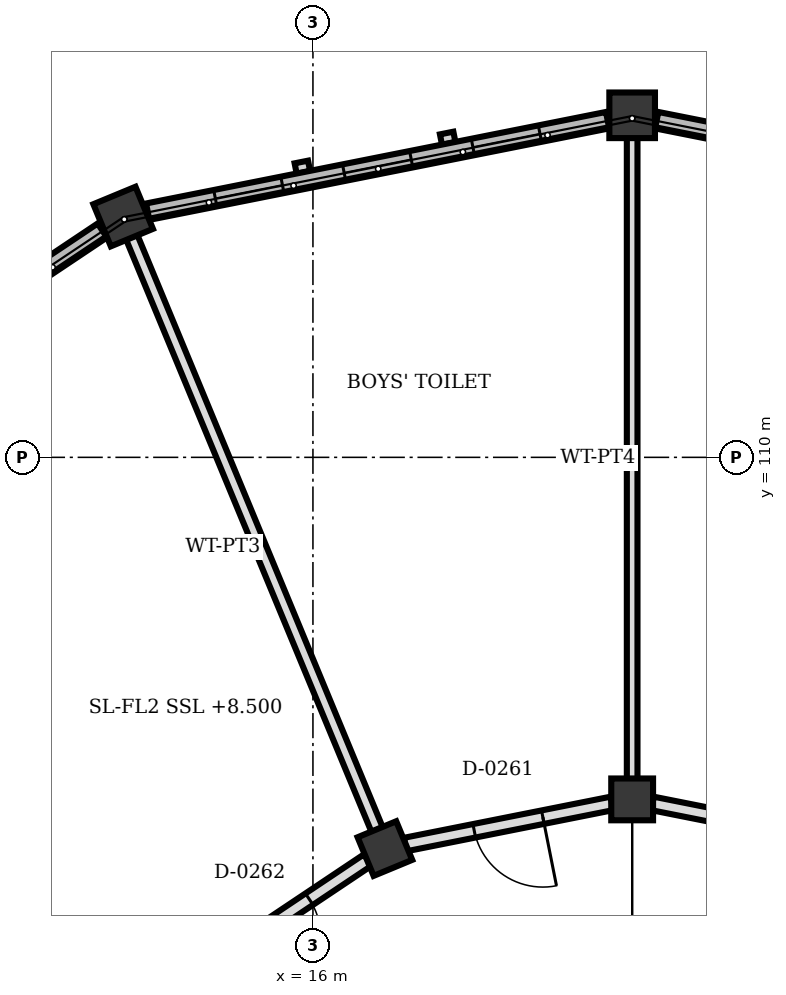
"""IFC4 building model, lengths in metres.
Left out: names, types, materials, properties, quantities, classifications, styles, units other than length and angle.
Written with IfcOpenShell. Run it as: python <this file> out.ifc"""

import sys

from ifc_helpers import new_model, si_unit, direction, frame, frame_2d, origin, origin_2d, place, context, subcontext, project, spatial, rectangle, extrude, element, fill, save


model = new_model("IFC4")
c1 = context("Model", 3, precision=1e-05, world=origin(), true_north=direction((0.0, 1.0)))
c2 = subcontext(c1, "Body", "Model", "MODEL_VIEW")
j1 = project(units=[si_unit("LENGTHUNIT", "METRE"), si_unit("PLANEANGLEUNIT", "RADIAN")], contexts=[c1])
p1 = place(None, origin())
s1 = spatial("IfcSite", under=j1, at=p1, CompositionType="ELEMENT")
p2 = place(p1, origin())
s2 = spatial("IfcBuilding", under=s1, at=p2, CompositionType="ELEMENT")
p3 = place(p2, frame((0.0, 0.0, 8.5)))
s3 = spatial("IfcBuildingStorey", under=s2, at=p3, CompositionType="ELEMENT", Elevation=8.5)
for number, where, z_axis, x_axis in (
    (1, (20.2, 105.5, 0.0), (0.0, 0.0, 1.0), (0.0, 1.0, 0.0)),
    (2, (16.947, 104.853, 0.0), (0.0, 0.0, 1.0), (-0.383, 0.924, 0.0)),
):
    element("IfcColumn", number, at=place(p3, frame(where, z_axis=z_axis, x_axis=x_axis)), inside=s3, PredefinedType="COLUMN", context=c2, shape_type="SweptSolid", body=[
        extrude(rectangle(XDim=0.55, YDim=0.55, at=origin_2d()), origin(), (0.0, 0.0, 1.0), 4.0),
    ])
for number, where, z_axis, x_axis in (
    (3, (20.2, 114.5, 0.0), (0.0, 0.0, 1.0), (0.0, 1.0, 0.0)),
    (4, (13.503, 113.168, 0.0), (0.0, 0.0, 1.0), (-0.383, 0.924, 0.0)),
):
    element("IfcColumn", number, at=place(p3, frame(where, z_axis=z_axis, x_axis=x_axis)), inside=s3, PredefinedType="COLUMN", context=c2, shape_type="SweptSolid", body=[
        extrude(rectangle(XDim=0.6, YDim=0.6, at=origin_2d()), origin(), (0.0, 0.0, 1.0), 4.0),
    ])
p4 = place(p3, frame((20.523, 114.436, 0.0), z_axis=(0.0, 0.0, 1.0), x_axis=(0.980770460131, -0.195164813773, 0.0)))
e5 = element("IfcWall", 5, at=p4, inside=s3, PredefinedType="SOLIDWALL", context=c2, shape_type="SweptSolid", body=[
    extrude(rectangle(XDim=6.17, YDim=0.22, at=frame_2d((3.085, 0.0))), origin(), (0.0, 0.0, 1.0), 3.172),
])
p5 = place(p4, frame((0.907, 0.0, 0.85)))
e6 = element("IfcOpeningElement", 6, at=p5, cuts=e5, PredefinedType="OPENING", context=c2, shape_type="SweptSolid", body=[
    extrude(rectangle(XDim=0.9, YDim=1.4, at=frame_2d((0.45, 0.7))), frame((0.0, 0.12, 0.0), z_axis=(0.0, -1.0, 0.0), x_axis=(1.0, 0.0, 0.0)), (0.0, 0.0, 1.0), 0.24),
])
p6 = place(p4, frame((2.635, 0.0, 0.85)))
e7 = element("IfcOpeningElement", 7, at=p6, cuts=e5, PredefinedType="OPENING", context=c2, shape_type="SweptSolid", body=[
    extrude(rectangle(XDim=0.9, YDim=1.4, at=frame_2d((0.45, 0.7))), frame((0.0, 0.12, 0.0), z_axis=(0.0, -1.0, 0.0), x_axis=(1.0, 0.0, 0.0)), (0.0, 0.0, 1.0), 0.24),
])
p7 = place(p4, frame((4.362, 0.0, 0.85)))
e8 = element("IfcOpeningElement", 8, at=p7, cuts=e5, PredefinedType="OPENING", context=c2, shape_type="SweptSolid", body=[
    extrude(rectangle(XDim=0.9, YDim=1.4, at=frame_2d((0.45, 0.7))), frame((0.0, 0.12, 0.0), z_axis=(0.0, -1.0, 0.0), x_axis=(1.0, 0.0, 0.0)), (0.0, 0.0, 1.0), 0.24),
])
p8 = place(p3, frame((13.826, 113.232, 0.0), z_axis=(0.0, 0.0, 1.0), x_axis=(0.980770460131, 0.195164813773, 0.0)))
e9 = element("IfcWall", 9, at=p8, inside=s3, PredefinedType="SOLIDWALL", context=c2, shape_type="SweptSolid", body=[
    extrude(rectangle(XDim=6.17, YDim=0.22, at=frame_2d((3.085, 0.0))), origin(), (0.0, 0.0, 1.0), 3.172),
])
p9 = place(p8, frame((0.907, 0.0, 0.85)))
e10 = element("IfcOpeningElement", 10, at=p9, cuts=e9, PredefinedType="OPENING", context=c2, shape_type="SweptSolid", body=[
    extrude(rectangle(XDim=0.9, YDim=1.4, at=frame_2d((0.45, 0.7))), frame((0.0, 0.12, 0.0), z_axis=(0.0, -1.0, 0.0), x_axis=(1.0, 0.0, 0.0)), (0.0, 0.0, 1.0), 0.24),
])
p10 = place(p8, frame((2.635, 0.0, 0.85)))
e11 = element("IfcOpeningElement", 11, at=p10, cuts=e9, PredefinedType="OPENING", context=c2, shape_type="SweptSolid", body=[
    extrude(rectangle(XDim=0.9, YDim=1.4, at=frame_2d((0.45, 0.7))), frame((0.0, 0.12, 0.0), z_axis=(0.0, -1.0, 0.0), x_axis=(1.0, 0.0, 0.0)), (0.0, 0.0, 1.0), 0.24),
])
p11 = place(p8, frame((4.362, 0.0, 0.85)))
e12 = element("IfcOpeningElement", 12, at=p11, cuts=e9, PredefinedType="OPENING", context=c2, shape_type="SweptSolid", body=[
    extrude(rectangle(XDim=0.9, YDim=1.4, at=frame_2d((0.45, 0.7))), frame((0.0, 0.12, 0.0), z_axis=(0.0, -1.0, 0.0), x_axis=(1.0, 0.0, 0.0)), (0.0, 0.0, 1.0), 0.24),
])
p12 = place(p3, frame((8.1, 109.557, 0.0), z_axis=(0.0, 0.0, 1.0), x_axis=(0.831379966495, 0.555704374025, 0.0)))
e13 = element("IfcWall", 13, at=p12, inside=s3, PredefinedType="SOLIDWALL", context=c2, shape_type="SweptSolid", body=[
    extrude(rectangle(XDim=6.169, YDim=0.22, at=frame_2d((3.084, 0.0))), origin(), (0.0, 0.0, 1.0), 3.172),
])
p13 = place(p12, frame((0.907, 0.0, 0.85)))
e14 = element("IfcOpeningElement", 14, at=p13, cuts=e13, PredefinedType="OPENING", context=c2, shape_type="SweptSolid", body=[
    extrude(rectangle(XDim=0.9, YDim=1.4, at=frame_2d((0.45, 0.7))), frame((0.0, 0.12, 0.0), z_axis=(0.0, -1.0, 0.0), x_axis=(1.0, 0.0, 0.0)), (0.0, 0.0, 1.0), 0.24),
])
p14 = place(p12, frame((2.635, 0.0, 0.85)))
e15 = element("IfcOpeningElement", 15, at=p14, cuts=e13, PredefinedType="OPENING", context=c2, shape_type="SweptSolid", body=[
    extrude(rectangle(XDim=0.9, YDim=1.4, at=frame_2d((0.45, 0.7))), frame((0.0, 0.12, 0.0), z_axis=(0.0, -1.0, 0.0), x_axis=(1.0, 0.0, 0.0)), (0.0, 0.0, 1.0), 0.24),
])
p15 = place(p12, frame((4.362, 0.0, 0.85)))
e16 = element("IfcOpeningElement", 16, at=p15, cuts=e13, PredefinedType="OPENING", context=c2, shape_type="SweptSolid", body=[
    extrude(rectangle(XDim=0.9, YDim=1.4, at=frame_2d((0.45, 0.7))), frame((0.0, 0.12, 0.0), z_axis=(0.0, -1.0, 0.0), x_axis=(1.0, 0.0, 0.0)), (0.0, 0.0, 1.0), 0.24),
])
p16 = place(p3, frame((20.2, 105.767, 0.0), z_axis=(0.0, 0.0, 1.0), x_axis=(0.0, 1.0, 0.0)))
e17 = element("IfcWall", 17, at=p16, inside=s3, PredefinedType="PARTITIONING", context=c2, shape_type="SweptSolid", body=[
    extrude(rectangle(XDim=8.441, YDim=0.14, at=frame_2d((4.22, 0.0))), origin(), (0.0, 0.0, 1.0), 3.072),
])
p17 = place(p3, frame((16.845, 105.1, 0.0), z_axis=(0.0, 0.0, 1.0), x_axis=(-0.382683896966, 0.923879340067, 0.0)))
e18 = element("IfcWall", 18, at=p17, inside=s3, PredefinedType="PARTITIONING", context=c2, shape_type="SweptSolid", body=[
    extrude(rectangle(XDim=8.44, YDim=0.16, at=frame_2d((4.22, 0.0))), origin(), (0.0, 0.0, 1.0), 3.072),
])
p18 = place(p3, frame((23.186, 104.906, 0.0), z_axis=(0.0, 0.0, 1.0), x_axis=(-0.980773264811, 0.195150718759, 0.0)))
e19 = element("IfcWall", 19, at=p18, inside=s3, PredefinedType="PARTITIONING", context=c2, shape_type="SweptSolid", body=[
    extrude(rectangle(XDim=2.772, YDim=0.18, at=frame_2d((1.386, 0.0))), origin(), (0.0, 0.0, 1.0), 3.072),
])
p19 = place(p18, frame((0.926, 0.0, 0.0)))
e20 = element("IfcOpeningElement", 20, at=p19, cuts=e19, PredefinedType="OPENING", context=c2, shape_type="SweptSolid", body=[
    extrude(rectangle(XDim=0.92, YDim=2.1, at=frame_2d((0.46, 1.05))), frame((0.0, 0.1, 0.0), z_axis=(0.0, -1.0, 0.0), x_axis=(1.0, 0.0, 0.0)), (0.0, 0.0, 1.0), 0.2),
])
p20 = place(p3, frame((19.933, 105.447, 0.0), z_axis=(0.0, 0.0, 1.0), x_axis=(-0.980773264811, -0.195150718759, 0.0)))
e21 = element("IfcWall", 21, at=p20, inside=s3, PredefinedType="PARTITIONING", context=c2, shape_type="SweptSolid", body=[
    extrude(rectangle(XDim=2.772, YDim=0.18, at=frame_2d((1.386, 0.0))), origin(), (0.0, 0.0, 1.0), 3.072),
])
p21 = place(p20, frame((0.926, 0.0, 0.0)))
e22 = element("IfcOpeningElement", 22, at=p21, cuts=e21, PredefinedType="OPENING", context=c2, shape_type="SweptSolid", body=[
    extrude(rectangle(XDim=0.92, YDim=2.1, at=frame_2d((0.46, 1.05))), frame((0.0, 0.1, 0.0), z_axis=(0.0, -1.0, 0.0), x_axis=(1.0, 0.0, 0.0)), (0.0, 0.0, 1.0), 0.2),
])
p22 = place(p3, frame((16.721, 104.702, 0.0), z_axis=(0.0, 0.0, 1.0), x_axis=(-0.831318045056, -0.555797002478, 0.0)))
e23 = element("IfcWall", 23, at=p22, inside=s3, PredefinedType="PARTITIONING", context=c2, shape_type="SweptSolid", body=[
    extrude(rectangle(XDim=2.773, YDim=0.18, at=frame_2d((1.386, 0.0))), origin(), (0.0, 0.0, 1.0), 3.072),
])
p23 = place(p22, frame((0.926, 0.0, 0.0)))
e24 = element("IfcOpeningElement", 24, at=p23, cuts=e23, PredefinedType="OPENING", context=c2, shape_type="SweptSolid", body=[
    extrude(rectangle(XDim=0.92, YDim=2.1, at=frame_2d((0.46, 1.05))), frame((0.0, 0.1, 0.0), z_axis=(0.0, -1.0, 0.0), x_axis=(1.0, 0.0, 0.0)), (0.0, 0.0, 1.0), 0.2),
])
p24 = place(p9, origin())
e25 = element("IfcWindow", 25, at=p24, inside=s3, PartitioningType="SINGLE_PANEL", PredefinedType="WINDOW", context=c2, shape_type="SweptSolid", body=[
    extrude(rectangle(XDim=0.9, YDim=1.4, at=frame_2d((0.45, 0.7))), frame((0.0, 0.03, 0.0), z_axis=(0.0, -1.0, 0.0), x_axis=(1.0, 0.0, 0.0)), (0.0, 0.0, 1.0), 0.06),
])
fill(e10, e25)
p25 = place(p10, origin())
e26 = element("IfcWindow", 26, at=p25, inside=s3, PartitioningType="SINGLE_PANEL", PredefinedType="WINDOW", context=c2, shape_type="SweptSolid", body=[
    extrude(rectangle(XDim=0.9, YDim=1.4, at=frame_2d((0.45, 0.7))), frame((0.0, 0.03, 0.0), z_axis=(0.0, -1.0, 0.0), x_axis=(1.0, 0.0, 0.0)), (0.0, 0.0, 1.0), 0.06),
])
fill(e11, e26)
p26 = place(p11, origin())
e27 = element("IfcWindow", 27, at=p26, inside=s3, PartitioningType="SINGLE_PANEL", PredefinedType="WINDOW", context=c2, shape_type="SweptSolid", body=[
    extrude(rectangle(XDim=0.9, YDim=1.4, at=frame_2d((0.45, 0.7))), frame((0.0, 0.03, 0.0), z_axis=(0.0, -1.0, 0.0), x_axis=(1.0, 0.0, 0.0)), (0.0, 0.0, 1.0), 0.06),
])
fill(e12, e27)
p27 = place(p21, origin())
e28 = element("IfcDoor", 28, at=p27, inside=s3, OperationType="SINGLE_SWING_LEFT", PredefinedType="DOOR", context=c2, shape_type="SweptSolid", body=[
    extrude(rectangle(XDim=0.92, YDim=2.1, at=frame_2d((0.46, 1.05))), frame((0.0, 0.025, 0.0), z_axis=(0.0, -1.0, 0.0), x_axis=(1.0, 0.0, 0.0)), (0.0, 0.0, 1.0), 0.05),
])
fill(e22, e28)
p28 = place(p23, origin())
e29 = element("IfcDoor", 29, at=p28, inside=s3, OperationType="SINGLE_SWING_RIGHT", PredefinedType="DOOR", context=c2, shape_type="SweptSolid", body=[
    extrude(rectangle(XDim=0.92, YDim=2.1, at=frame_2d((0.46, 1.05))), frame((0.0, 0.025, 0.0), z_axis=(0.0, -1.0, 0.0), x_axis=(1.0, 0.0, 0.0)), (0.0, 0.0, 1.0), 0.05),
])
fill(e24, e29)
save(model, sys.argv[1])
